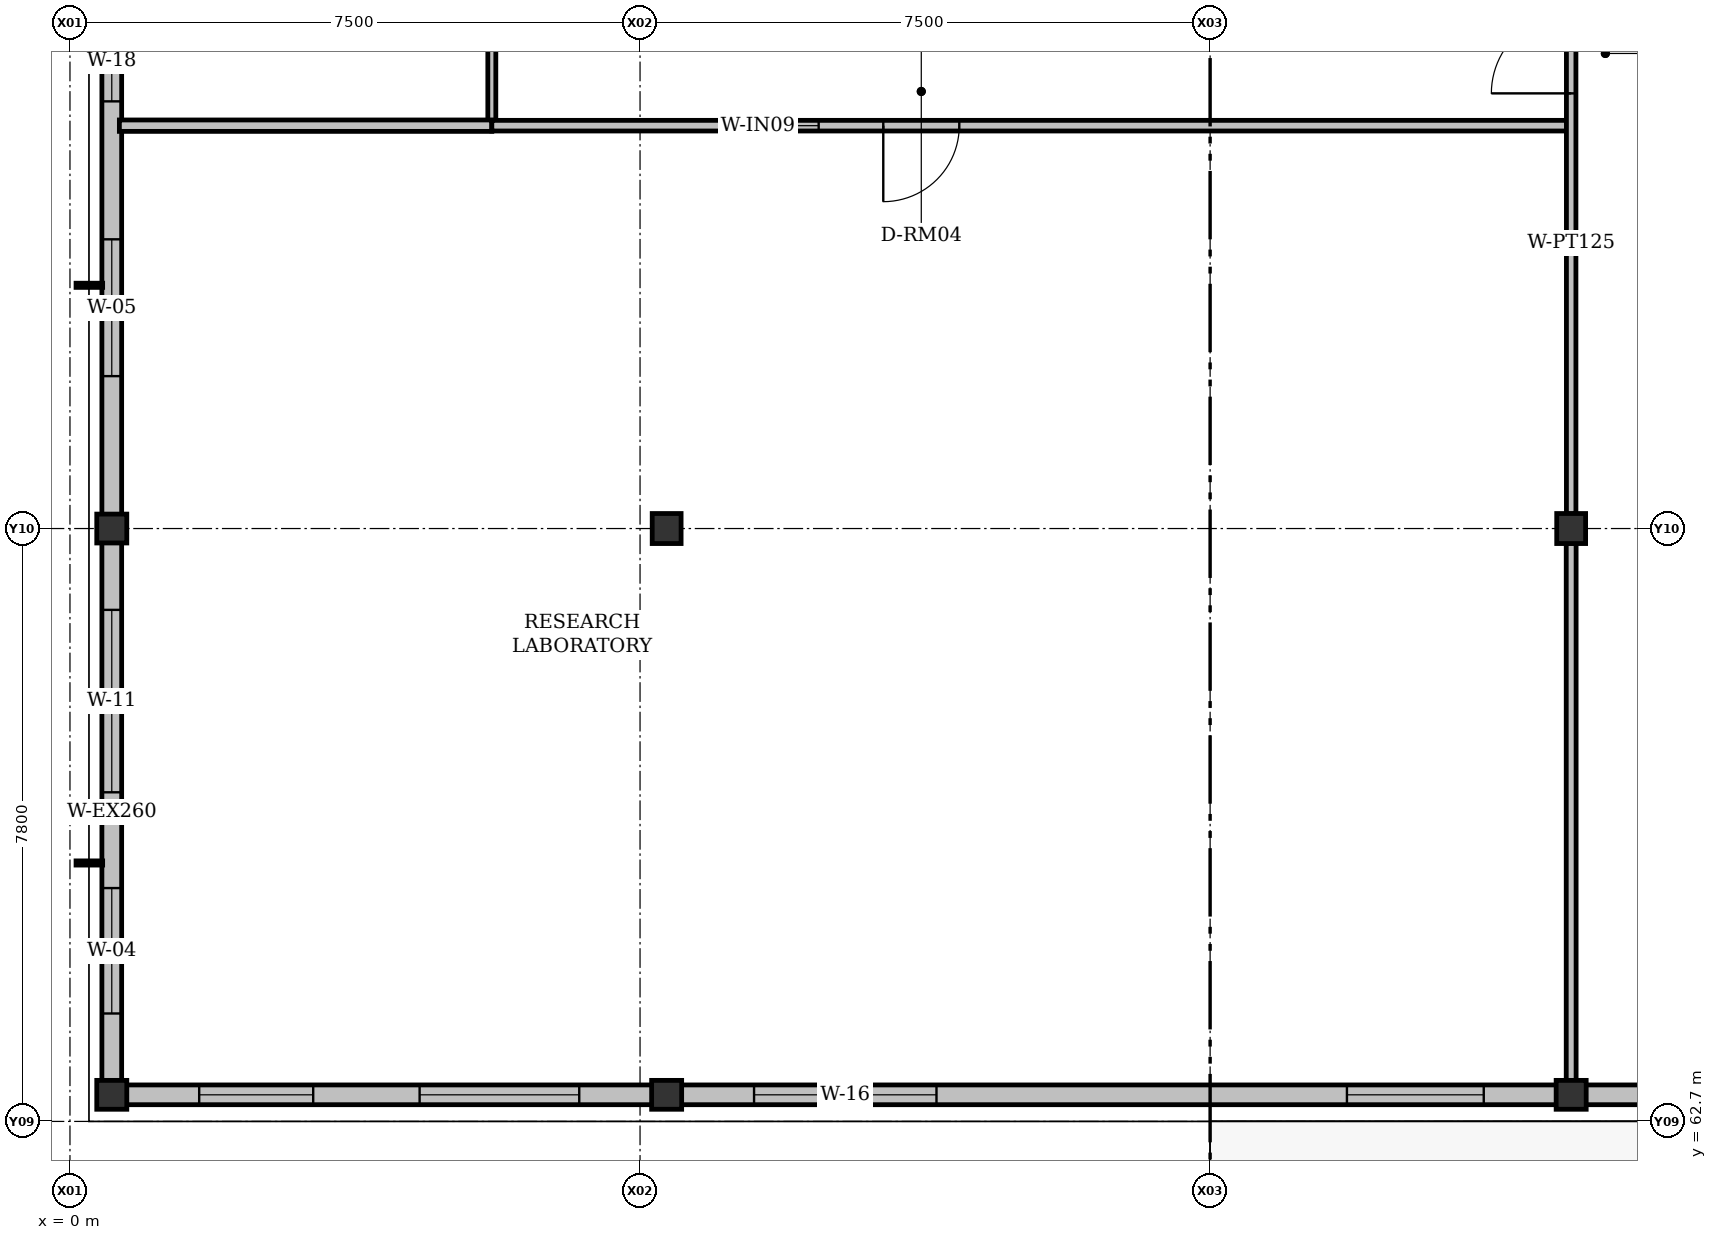
"""IFC4 building model, lengths in metres.
Left out: names, types, materials, properties, quantities, classifications, styles, units other than length and angle.
Written with IfcOpenShell. Run it as: python <this file> out.ifc"""

import sys

from ifc_helpers import new_model, si_unit, direction, frame, frame_2d, origin, origin_2d, place, context, subcontext, project, spatial, rectangle, i_section, extrude, element, fill, save


model = new_model("IFC4")
c1 = context("Model", 3, precision=1e-05, world=origin(), true_north=direction((0.0, 1.0)))
c2 = subcontext(c1, "Body", "Model", "MODEL_VIEW")
j1 = project(units=[si_unit("LENGTHUNIT", "METRE"), si_unit("PLANEANGLEUNIT", "RADIAN")], contexts=[c1])
p1 = place(None, origin())
s1 = spatial("IfcSite", under=j1, at=p1, CompositionType="ELEMENT")
p2 = place(p1, origin())
s2 = spatial("IfcBuilding", under=s1, at=p2, CompositionType="ELEMENT")
p3 = place(p2, frame((0.0, 0.0, 14.1)))
s3 = spatial("IfcBuildingStorey", under=s2, at=p3, CompositionType="ELEMENT", Elevation=14.1)
for number, where, z_axis, x_axis in (
    (1, (0.55, 63.05, 0.0), (0.0, 0.0, 1.0), (1.0, 0.0, 0.0)),
    (2, (7.85, 63.05, 0.0), (0.0, 0.0, 1.0), (1.0, 0.0, 0.0)),
    (3, (19.75, 63.05, 0.0), (0.0, 0.0, 1.0), (1.0, 0.0, 0.0)),
    (4, (0.55, 70.5, 0.0), (0.0, 0.0, 1.0), (1.0, 0.0, 0.0)),
    (5, (7.85, 70.5, 0.0), (0.0, 0.0, 1.0), (0.0, 1.0, 0.0)),
    (6, (19.75, 70.5, 0.0), (0.0, 0.0, 1.0), (0.0, 1.0, 0.0)),
):
    element("IfcColumn", number, at=place(p3, frame(where, z_axis=z_axis, x_axis=x_axis)), inside=s3, PredefinedType="COLUMN", context=c2, shape_type="SweptSolid", body=[
        extrude(i_section(OverallWidth=0.395, OverallDepth=0.38, WebThickness=0.019, FlangeThickness=0.03, FilletRadius=0.015, at=origin_2d()), origin(), (0.0, 0.0, 1.0), 4.2),
    ])
p4 = place(p3, frame((0.55, 63.05, 0.0), z_axis=(0.0, 0.0, 1.0), x_axis=(0.0, 1.0, 0.0)))
e7 = element("IfcWall", 7, at=p4, inside=s3, PredefinedType="SOLIDWALL", context=c2, shape_type="SweptSolid", body=[
    extrude(rectangle(XDim=7.45, YDim=0.26, at=frame_2d((3.725, 0.0))), origin(), (0.0, 0.0, 1.0), 3.577),
])
p5 = place(p4, frame((1.07, 0.0, 0.92)))
e8 = element("IfcOpeningElement", 8, at=p5, cuts=e7, PredefinedType="OPENING", context=c2, shape_type="SweptSolid", body=[
    extrude(rectangle(XDim=1.65, YDim=1.4, at=frame_2d((0.825, 0.7))), frame((0.0, 0.13, 0.0), z_axis=(0.0, -1.0, 0.0), x_axis=(1.0, 0.0, 0.0)), (0.0, 0.0, 1.0), 0.26),
])
p6 = place(p4, frame((3.98, 0.0, 0.92)))
e9 = element("IfcOpeningElement", 9, at=p6, cuts=e7, PredefinedType="OPENING", context=c2, shape_type="SweptSolid", body=[
    extrude(rectangle(XDim=2.4, YDim=1.55, at=frame_2d((1.2, 0.775))), frame((0.0, 0.13, 0.0), z_axis=(0.0, -1.0, 0.0), x_axis=(1.0, 0.0, 0.0)), (0.0, 0.0, 1.0), 0.26),
])
p7 = place(p3, frame((0.55, 70.5, 0.0), z_axis=(0.0, 0.0, 1.0), x_axis=(0.0, 1.0, 0.0)))
e10 = element("IfcWall", 10, at=p7, inside=s3, PredefinedType="SOLIDWALL", context=c2, shape_type="SweptSolid", body=[
    extrude(rectangle(XDim=7.5, YDim=0.26, at=frame_2d((3.75, 0.0))), origin(), (0.0, 0.0, 1.0), 3.577),
])
p8 = place(p7, frame((2.005, 0.0, 0.92)))
e11 = element("IfcOpeningElement", 11, at=p8, cuts=e10, PredefinedType="OPENING", context=c2, shape_type="SweptSolid", body=[
    extrude(rectangle(XDim=1.8, YDim=1.4, at=frame_2d((0.9, 0.7))), frame((0.0, 0.13, 0.0), z_axis=(0.0, -1.0, 0.0), x_axis=(1.0, 0.0, 0.0)), (0.0, 0.0, 1.0), 0.26),
])
p9 = place(p7, frame((5.62, 0.0, 0.92)))
e12 = element("IfcOpeningElement", 12, at=p9, cuts=e10, PredefinedType="OPENING", context=c2, shape_type="SweptSolid", body=[
    extrude(rectangle(XDim=1.05, YDim=1.3, at=frame_2d((0.525, 0.65))), frame((0.0, 0.13, 0.0), z_axis=(0.0, -1.0, 0.0), x_axis=(1.0, 0.0, 0.0)), (0.0, 0.0, 1.0), 0.26),
])
p10 = place(p3, frame((7.85, 63.05, 0.0), z_axis=(0.0, 0.0, 1.0), x_axis=(-1.0, 0.0, 0.0)))
e13 = element("IfcWall", 13, at=p10, inside=s3, PredefinedType="SOLIDWALL", context=c2, shape_type="SweptSolid", body=[
    extrude(rectangle(XDim=7.3, YDim=0.26, at=frame_2d((3.65, 0.0))), origin(), (0.0, 0.0, 1.0), 3.577),
])
p11 = place(p10, frame((1.15, 0.0, 0.92)))
e14 = element("IfcOpeningElement", 14, at=p11, cuts=e13, PredefinedType="OPENING", context=c2, shape_type="SweptSolid", body=[
    extrude(rectangle(XDim=2.1, YDim=1.4, at=frame_2d((1.05, 0.7))), frame((0.0, 0.13, 0.0), z_axis=(0.0, -1.0, 0.0), x_axis=(1.0, 0.0, 0.0)), (0.0, 0.0, 1.0), 0.26),
])
p12 = place(p10, frame((4.65, 0.0, 0.92)))
e15 = element("IfcOpeningElement", 15, at=p12, cuts=e13, PredefinedType="OPENING", context=c2, shape_type="SweptSolid", body=[
    extrude(rectangle(XDim=1.5, YDim=1.7, at=frame_2d((0.75, 0.85))), frame((0.0, 0.13, 0.0), z_axis=(0.0, -1.0, 0.0), x_axis=(1.0, 0.0, 0.0)), (0.0, 0.0, 1.0), 0.26),
])
p13 = place(p3, frame((19.75, 63.05, 0.0), z_axis=(0.0, 0.0, 1.0), x_axis=(-1.0, 0.0, 0.0)))
e16 = element("IfcWall", 16, at=p13, inside=s3, PredefinedType="SOLIDWALL", context=c2, shape_type="SweptSolid", body=[
    extrude(rectangle(XDim=11.9, YDim=0.26, at=frame_2d((5.95, 0.0))), origin(), (0.0, 0.0, 1.0), 3.577),
])
p14 = place(p13, frame((1.15, 0.0, 0.92)))
e17 = element("IfcOpeningElement", 17, at=p14, cuts=e16, PredefinedType="OPENING", context=c2, shape_type="SweptSolid", body=[
    extrude(rectangle(XDim=1.8, YDim=1.55, at=frame_2d((0.9, 0.775))), frame((0.0, 0.13, 0.0), z_axis=(0.0, -1.0, 0.0), x_axis=(1.0, 0.0, 0.0)), (0.0, 0.0, 1.0), 0.26),
])
p15 = place(p13, frame((8.35, 0.0, 0.92)))
e18 = element("IfcOpeningElement", 18, at=p15, cuts=e16, PredefinedType="OPENING", context=c2, shape_type="SweptSolid", body=[
    extrude(rectangle(XDim=2.4, YDim=1.7, at=frame_2d((1.2, 0.85))), frame((0.0, 0.13, 0.0), z_axis=(0.0, -1.0, 0.0), x_axis=(1.0, 0.0, 0.0)), (0.0, 0.0, 1.0), 0.26),
])
p16 = place(p3, frame((27.925, 63.05, 0.0), z_axis=(0.0, 0.0, 1.0), x_axis=(-1.0, 0.0, 0.0)))
e19 = element("IfcWall", 19, at=p16, inside=s3, PredefinedType="SOLIDWALL", context=c2, shape_type="SweptSolid", body=[
    extrude(rectangle(XDim=8.175, YDim=0.26, at=frame_2d((4.087, 0.0))), origin(), (0.0, 0.0, 1.0), 3.577),
])
p17 = place(p16, frame((1.15, 0.0, 0.92)))
e20 = element("IfcOpeningElement", 20, at=p17, cuts=e19, PredefinedType="OPENING", context=c2, shape_type="SweptSolid", body=[
    extrude(rectangle(XDim=1.5, YDim=1.7, at=frame_2d((0.75, 0.85))), frame((0.0, 0.13, 0.0), z_axis=(0.0, -1.0, 0.0), x_axis=(1.0, 0.0, 0.0)), (0.0, 0.0, 1.0), 0.26),
])
p18 = place(p16, frame((5.025, 0.0, 0.92)))
e21 = element("IfcOpeningElement", 21, at=p18, cuts=e19, PredefinedType="OPENING", context=c2, shape_type="SweptSolid", body=[
    extrude(rectangle(XDim=2.0, YDim=1.35, at=frame_2d((1.0, 0.675))), frame((0.0, 0.13, 0.0), z_axis=(0.0, -1.0, 0.0), x_axis=(1.0, 0.0, 0.0)), (0.0, 0.0, 1.0), 0.26),
])
p19 = place(p3, frame((5.55, 75.8, 0.0), z_axis=(0.0, 0.0, 1.0), x_axis=(0.0, 1.0, 0.0)))
e22 = element("IfcWall", 22, at=p19, inside=s3, PredefinedType="PARTITIONING", context=c2, shape_type="SweptSolid", body=[
    extrude(rectangle(XDim=27.8, YDim=0.105, at=frame_2d((13.9, 0.0))), origin(), (0.0, 0.0, 1.0), 3.451),
])
p20 = place(p19, frame((13.06, 0.0, 0.0)))
e23 = element("IfcOpeningElement", 23, at=p20, cuts=e22, PredefinedType="OPENING", context=c2, shape_type="SweptSolid", body=[
    extrude(rectangle(XDim=1.68, YDim=2.35, at=frame_2d((0.84, 1.175))), frame((0.0, 0.052, 0.0), z_axis=(0.0, -1.0, 0.0), x_axis=(1.0, 0.0, 0.0)), (0.0, 0.0, 1.0), 0.105),
])
p21 = place(p19, frame((15.59, 0.0, 0.92)))
e24 = element("IfcOpeningElement", 24, at=p21, cuts=e22, PredefinedType="OPENING", context=c2, shape_type="SweptSolid", body=[
    extrude(rectangle(XDim=1.05, YDim=1.2, at=frame_2d((0.525, 0.6))), frame((0.0, 0.052, 0.0), z_axis=(0.0, -1.0, 0.0), x_axis=(1.0, 0.0, 0.0)), (0.0, 0.0, 1.0), 0.105),
])
p22 = place(p3, frame((0.65, 75.8, 0.0), z_axis=(0.0, 0.0, 1.0), x_axis=(1.0, 0.0, 0.0)))
e25 = element("IfcWall", 25, at=p22, inside=s3, PredefinedType="PARTITIONING", context=c2, shape_type="SweptSolid", body=[
    extrude(rectangle(XDim=4.9, YDim=0.15, at=frame_2d((2.45, 0.0))), origin(), (0.0, 0.0, 1.0), 3.95),
])
p23 = place(p3, frame((19.75, 75.8, 0.0), z_axis=(0.0, 0.0, 1.0), x_axis=(-1.0, 0.0, 0.0)))
e26 = element("IfcWall", 26, at=p23, inside=s3, PredefinedType="PARTITIONING", context=c2, shape_type="SweptSolid", body=[
    extrude(rectangle(XDim=14.2, YDim=0.14, at=frame_2d((7.1, 0.0))), origin(), (0.0, 0.0, 1.0), 3.527),
])
p24 = place(p23, frame((8.05, 0.0, 0.0)))
e27 = element("IfcOpeningElement", 27, at=p24, cuts=e26, PredefinedType="OPENING", context=c2, shape_type="SweptSolid", body=[
    extrude(rectangle(XDim=1.0, YDim=2.1, at=frame_2d((0.5, 1.05))), frame((0.0, 0.07, 0.0), z_axis=(0.0, -1.0, 0.0), x_axis=(1.0, 0.0, 0.0)), (0.0, 0.0, 1.0), 0.14),
])
p25 = place(p23, frame((9.9, 0.0, 0.92)))
e28 = element("IfcOpeningElement", 28, at=p25, cuts=e26, PredefinedType="OPENING", context=c2, shape_type="SweptSolid", body=[
    extrude(rectangle(XDim=1.0, YDim=1.3, at=frame_2d((0.5, 0.65))), frame((0.0, 0.07, 0.0), z_axis=(0.0, -1.0, 0.0), x_axis=(1.0, 0.0, 0.0)), (0.0, 0.0, 1.0), 0.14),
])
p26 = place(p3, frame((19.75, 63.235, 0.0), z_axis=(0.0, 0.0, 1.0), x_axis=(0.0, 1.0, 0.0)))
e29 = element("IfcWall", 29, at=p26, inside=s3, PredefinedType="PARTITIONING", context=c2, shape_type="SweptSolid", body=[
    extrude(rectangle(XDim=7.073, YDim=0.13, at=frame_2d((3.536, 0.0))), origin(), (0.0, 0.0, 1.0), 3.527),
])
p27 = place(p3, frame((19.75, 70.692, 0.0), z_axis=(0.0, 0.0, 1.0), x_axis=(0.0, 1.0, 0.0)))
e30 = element("IfcWall", 30, at=p27, inside=s3, PredefinedType="PARTITIONING", context=c2, shape_type="SweptSolid", body=[
    extrude(rectangle(XDim=7.123, YDim=0.125, at=frame_2d((3.561, 0.0))), origin(), (0.0, 0.0, 1.0), 3.527),
])
p28 = place(p27, frame((5.532, 0.0, 0.0)))
e31 = element("IfcOpeningElement", 31, at=p28, cuts=e30, PredefinedType="OPENING", context=c2, shape_type="SweptSolid", body=[
    extrude(rectangle(XDim=1.05, YDim=2.1, at=frame_2d((0.525, 1.05))), frame((0.0, 0.062, 0.0), z_axis=(0.0, -1.0, 0.0), x_axis=(1.0, 0.0, 0.0)), (0.0, 0.0, 1.0), 0.125),
])
p29 = place(p5, origin())
e32 = element("IfcWindow", 32, at=p29, inside=s3, PartitioningType="DOUBLE_PANEL_VERTICAL", PredefinedType="WINDOW", context=c2, shape_type="SweptSolid", body=[
    extrude(rectangle(XDim=1.65, YDim=1.4, at=frame_2d((0.825, 0.7))), frame((0.0, 0.03, 0.0), z_axis=(0.0, -1.0, 0.0), x_axis=(1.0, 0.0, 0.0)), (0.0, 0.0, 1.0), 0.06),
])
fill(e8, e32)
p30 = place(p6, origin())
e33 = element("IfcWindow", 33, at=p30, inside=s3, PartitioningType="DOUBLE_PANEL_VERTICAL", PredefinedType="WINDOW", context=c2, shape_type="SweptSolid", body=[
    extrude(rectangle(XDim=2.4, YDim=1.55, at=frame_2d((1.2, 0.775))), frame((0.0, 0.03, 0.0), z_axis=(0.0, -1.0, 0.0), x_axis=(1.0, 0.0, 0.0)), (0.0, 0.0, 1.0), 0.06),
])
fill(e9, e33)
p31 = place(p8, origin())
e34 = element("IfcWindow", 34, at=p31, inside=s3, PartitioningType="DOUBLE_PANEL_VERTICAL", PredefinedType="WINDOW", context=c2, shape_type="SweptSolid", body=[
    extrude(rectangle(XDim=1.8, YDim=1.4, at=frame_2d((0.9, 0.7))), frame((0.0, 0.03, 0.0), z_axis=(0.0, -1.0, 0.0), x_axis=(1.0, 0.0, 0.0)), (0.0, 0.0, 1.0), 0.06),
])
fill(e11, e34)
p32 = place(p9, origin())
e35 = element("IfcWindow", 35, at=p32, inside=s3, PartitioningType="SINGLE_PANEL", PredefinedType="WINDOW", context=c2, shape_type="SweptSolid", body=[
    extrude(rectangle(XDim=1.05, YDim=1.3, at=frame_2d((0.525, 0.65))), frame((0.0, 0.03, 0.0), z_axis=(0.0, -1.0, 0.0), x_axis=(1.0, 0.0, 0.0)), (0.0, 0.0, 1.0), 0.06),
])
fill(e12, e35)
p33 = place(p11, origin())
e36 = element("IfcWindow", 36, at=p33, inside=s3, PartitioningType="DOUBLE_PANEL_VERTICAL", PredefinedType="WINDOW", context=c2, shape_type="SweptSolid", body=[
    extrude(rectangle(XDim=2.1, YDim=1.4, at=frame_2d((1.05, 0.7))), frame((0.0, 0.03, 0.0), z_axis=(0.0, -1.0, 0.0), x_axis=(1.0, 0.0, 0.0)), (0.0, 0.0, 1.0), 0.06),
])
fill(e14, e36)
p34 = place(p12, origin())
e37 = element("IfcWindow", 37, at=p34, inside=s3, PartitioningType="SINGLE_PANEL", PredefinedType="WINDOW", context=c2, shape_type="SweptSolid", body=[
    extrude(rectangle(XDim=1.5, YDim=1.7, at=frame_2d((0.75, 0.85))), frame((0.0, 0.03, 0.0), z_axis=(0.0, -1.0, 0.0), x_axis=(1.0, 0.0, 0.0)), (0.0, 0.0, 1.0), 0.06),
])
fill(e15, e37)
p35 = place(p14, origin())
e38 = element("IfcWindow", 38, at=p35, inside=s3, PartitioningType="DOUBLE_PANEL_VERTICAL", PredefinedType="WINDOW", context=c2, shape_type="SweptSolid", body=[
    extrude(rectangle(XDim=1.8, YDim=1.55, at=frame_2d((0.9, 0.775))), frame((0.0, 0.03, 0.0), z_axis=(0.0, -1.0, 0.0), x_axis=(1.0, 0.0, 0.0)), (0.0, 0.0, 1.0), 0.06),
])
fill(e17, e38)
p36 = place(p15, origin())
e39 = element("IfcWindow", 39, at=p36, inside=s3, PartitioningType="DOUBLE_PANEL_VERTICAL", PredefinedType="WINDOW", context=c2, shape_type="SweptSolid", body=[
    extrude(rectangle(XDim=2.4, YDim=1.7, at=frame_2d((1.2, 0.85))), frame((0.0, 0.03, 0.0), z_axis=(0.0, -1.0, 0.0), x_axis=(1.0, 0.0, 0.0)), (0.0, 0.0, 1.0), 0.06),
])
fill(e18, e39)
p37 = place(p24, origin())
e40 = element("IfcDoor", 40, at=p37, inside=s3, OperationType="SINGLE_SWING_RIGHT", PredefinedType="DOOR", context=c2, shape_type="SweptSolid", body=[
    extrude(rectangle(XDim=1.0, YDim=2.1, at=frame_2d((0.5, 1.05))), frame((0.0, 0.025, 0.0), z_axis=(0.0, -1.0, 0.0), x_axis=(1.0, 0.0, 0.0)), (0.0, 0.0, 1.0), 0.05),
])
fill(e27, e40)
p38 = place(p25, origin())
e41 = element("IfcWindow", 41, at=p38, inside=s3, PartitioningType="SINGLE_PANEL", PredefinedType="WINDOW", context=c2, shape_type="SweptSolid", body=[
    extrude(rectangle(XDim=1.0, YDim=1.3, at=frame_2d((0.5, 0.65))), frame((0.0, 0.03, 0.0), z_axis=(0.0, -1.0, 0.0), x_axis=(1.0, 0.0, 0.0)), (0.0, 0.0, 1.0), 0.06),
])
fill(e28, e41)
p39 = place(p28, origin())
e42 = element("IfcDoor", 42, at=p39, inside=s3, OperationType="SINGLE_SWING_LEFT", PredefinedType="DOOR", context=c2, shape_type="SweptSolid", body=[
    extrude(rectangle(XDim=1.05, YDim=2.1, at=frame_2d((0.525, 1.05))), frame((0.0, 0.025, 0.0), z_axis=(0.0, -1.0, 0.0), x_axis=(1.0, 0.0, 0.0)), (0.0, 0.0, 1.0), 0.05),
])
fill(e31, e42)
save(model, sys.argv[1])
